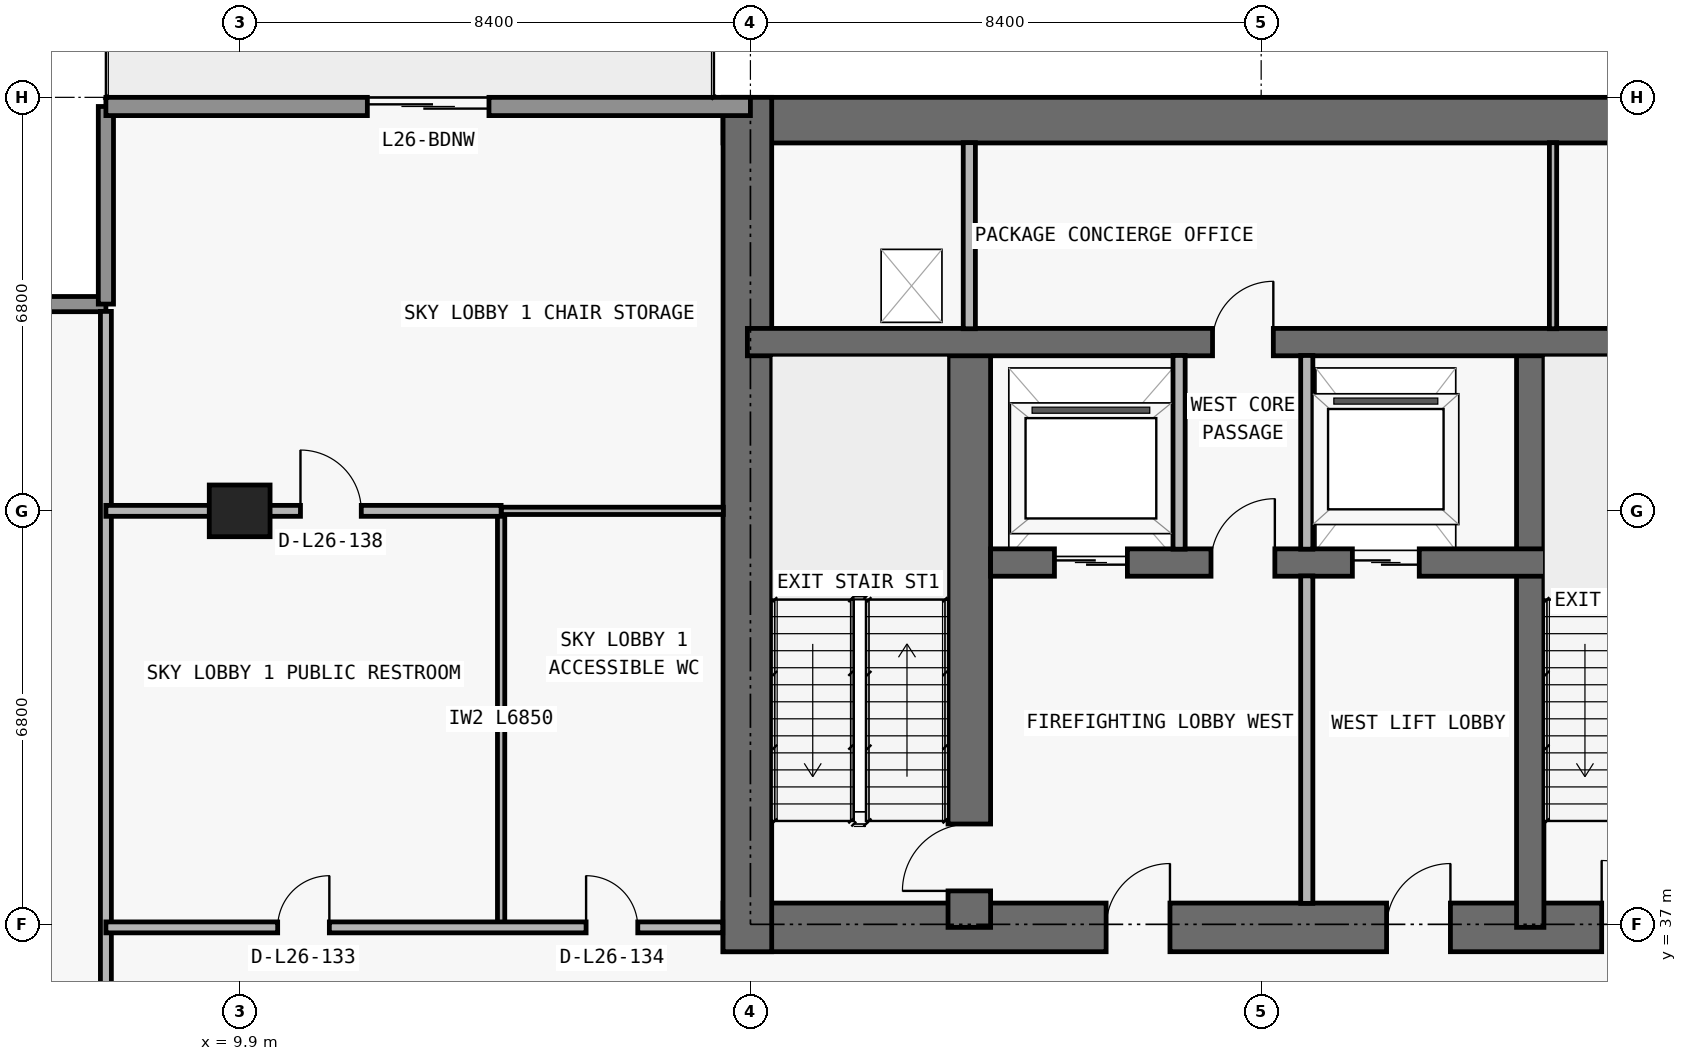
"""IFC4 building model, lengths in metres.
Left out: names, types, materials, properties, quantities, classifications, styles, units other than length and angle.
Written with IfcOpenShell. Run it as: python <this file> out.ifc"""

import sys

from ifc_helpers import new_model, si_unit, direction, frame, frame_2d, origin, origin_2d, place, context, subcontext, project, spatial, rectangle, extrude, element, fill, save


model = new_model("IFC4")
c1 = context("Model", 3, precision=1e-05, world=origin(), true_north=direction((0.0, 1.0)))
c2 = subcontext(c1, "Body", "Model", "MODEL_VIEW")
j1 = project(units=[si_unit("LENGTHUNIT", "METRE"), si_unit("PLANEANGLEUNIT", "RADIAN")], contexts=[c1])
p1 = place(None, origin())
s1 = spatial("IfcSite", under=j1, at=p1, CompositionType="ELEMENT")
p2 = place(p1, origin())
s2 = spatial("IfcBuilding", under=s1, at=p2, CompositionType="ELEMENT")
p3 = place(p2, frame((0.0, 0.0, 97.8)))
s3 = spatial("IfcBuildingStorey", under=s2, at=p3, CompositionType="ELEMENT", Elevation=97.8)
p4 = place(p3, frame((9.9, 43.8, 0.0), z_axis=(0.0, 0.0, 1.0), x_axis=(1.0, 0.0, 0.0)))
e1 = element("IfcColumn", 1, at=p4, inside=s3, PredefinedType="COLUMN", context=c2, shape_type="SweptSolid", body=[
    extrude(rectangle(XDim=1.0, YDim=0.85, at=origin_2d()), origin(), (0.0, 0.0, 1.0), 4.55),
])
p5 = place(p3, frame((17.85, 36.95, 0.0), z_axis=(0.0, 0.0, 1.0), x_axis=(1.0, 0.0, 0.0)))
e2 = element("IfcWall", 2, at=p5, inside=s3, PredefinedType="SHEAR", context=c2, shape_type="SweptSolid", body=[
    extrude(rectangle(XDim=42.1, YDim=0.8, at=frame_2d((21.05, 0.0))), origin(), (0.0, 0.0, 1.0), 4.55),
])
p6 = place(p5, frame((14.45, 0.0, 0.0)))
e3 = element("IfcOpeningElement", 3, at=p6, cuts=e2, PredefinedType="OPENING", context=c2, shape_type="SweptSolid", body=[
    extrude(rectangle(XDim=1.1, YDim=2.15, at=frame_2d((0.55, 1.075))), frame((0.0, 0.41, 0.0), z_axis=(0.0, -1.0, 0.0), x_axis=(1.0, 0.0, 0.0)), (0.0, 0.0, 1.0), 0.82),
])
p7 = place(p5, frame((6.3, 0.0, 0.0)))
e4 = element("IfcOpeningElement", 4, at=p7, cuts=e2, PredefinedType="OPENING", context=c2, shape_type="SweptSolid", body=[
    extrude(rectangle(XDim=1.05, YDim=2.15, at=frame_2d((0.525, 1.075))), frame((0.0, 0.41, 0.0), z_axis=(0.0, -1.0, 0.0), x_axis=(1.0, 0.0, 0.0)), (0.0, 0.0, 1.0), 0.82),
])
p8 = place(p5, frame((34.8, 0.0, 0.0)))
e5 = element("IfcOpeningElement", 5, at=p8, cuts=e2, PredefinedType="OPENING", context=c2, shape_type="SweptSolid", body=[
    extrude(rectangle(XDim=1.05, YDim=2.15, at=frame_2d((0.525, 1.075))), frame((0.0, 0.41, 0.0), z_axis=(0.0, -1.0, 0.0), x_axis=(1.0, 0.0, 0.0)), (0.0, 0.0, 1.0), 0.82),
])
p9 = place(p5, frame((10.913, 0.0, 0.0)))
e6 = element("IfcOpeningElement", 6, at=p9, cuts=e2, PredefinedType="OPENING", context=c2, shape_type="SweptSolid", body=[
    extrude(rectangle(XDim=1.05, YDim=2.15, at=frame_2d((0.525, 1.075))), frame((0.0, 0.41, 0.0), z_axis=(0.0, -1.0, 0.0), x_axis=(1.0, 0.0, 0.0)), (0.0, 0.0, 1.0), 0.82),
])
p10 = place(p5, frame((24.15, 0.0, 0.0)))
e7 = element("IfcOpeningElement", 7, at=p10, cuts=e2, PredefinedType="OPENING", context=c2, shape_type="SweptSolid", body=[
    extrude(rectangle(XDim=1.05, YDim=2.15, at=frame_2d((0.525, 1.075))), frame((0.0, 0.41, 0.0), z_axis=(0.0, -1.0, 0.0), x_axis=(1.0, 0.0, 0.0)), (0.0, 0.0, 1.0), 0.82),
])
p11 = place(p3, frame((17.85, 50.225, 0.0), z_axis=(0.0, 0.0, 1.0), x_axis=(1.0, 0.0, 0.0)))
e8 = element("IfcWall", 8, at=p11, inside=s3, PredefinedType="SHEAR", context=c2, shape_type="SweptSolid", body=[
    extrude(rectangle(XDim=42.1, YDim=0.75, at=frame_2d((21.05, 0.0))), origin(), (0.0, 0.0, 1.0), 4.55),
])
p12 = place(p3, frame((18.25, 36.55, 0.0), z_axis=(0.0, 0.0, 1.0), x_axis=(0.0, 1.0, 0.0)))
e9 = element("IfcWall", 9, at=p12, inside=s3, PredefinedType="SHEAR", context=c2, shape_type="SweptSolid", body=[
    extrude(rectangle(XDim=14.05, YDim=0.8, at=frame_2d((7.025, 0.0))), origin(), (0.0, 0.0, 1.0), 4.55),
])
p13 = place(p3, frame((21.9, 36.95, 0.0), z_axis=(0.0, 0.0, 1.0), x_axis=(0.0, 1.0, 0.0)))
e10 = element("IfcWall", 10, at=p13, inside=s3, PredefinedType="SHEAR", context=c2, shape_type="SweptSolid", body=[
    extrude(rectangle(XDim=9.625, YDim=0.7, at=frame_2d((4.812, 0.0))), origin(), (0.0, 0.0, 1.0), 4.55),
])
p14 = place(p13, frame((0.6, 0.0, 0.0)))
e11 = element("IfcOpeningElement", 11, at=p14, cuts=e10, PredefinedType="OPENING", context=c2, shape_type="SweptSolid", body=[
    extrude(rectangle(XDim=1.1, YDim=2.15, at=frame_2d((0.55, 1.075))), frame((0.0, 0.36, 0.0), z_axis=(0.0, -1.0, 0.0), x_axis=(1.0, 0.0, 0.0)), (0.0, 0.0, 1.0), 0.72),
])
p15 = place(p3, frame((31.125, 36.95, 0.0), z_axis=(0.0, 0.0, 1.0), x_axis=(0.0, 1.0, 0.0)))
e12 = element("IfcWall", 12, at=p15, inside=s3, PredefinedType="SHEAR", context=c2, shape_type="SweptSolid", body=[
    extrude(rectangle(XDim=9.625, YDim=0.45, at=frame_2d((4.812, 0.0))), origin(), (0.0, 0.0, 1.0), 4.55),
])
p16 = place(p3, frame((22.25, 42.95, 0.0), z_axis=(0.0, 0.0, 1.0), x_axis=(1.0, 0.0, 0.0)))
e13 = element("IfcWall", 13, at=p16, inside=s3, PredefinedType="SHEAR", context=c2, shape_type="SweptSolid", body=[
    extrude(rectangle(XDim=33.3, YDim=0.45, at=frame_2d((16.65, 0.0))), origin(), (0.0, 0.0, 1.0), 4.55),
])
p17 = place(p16, frame((1.05, 0.0, 0.0)))
e14 = element("IfcOpeningElement", 14, at=p17, cuts=e13, PredefinedType="OPENING", context=c2, shape_type="SweptSolid", body=[
    extrude(rectangle(XDim=1.2, YDim=2.2, at=frame_2d((0.6, 1.1))), frame((0.0, 0.235, 0.0), z_axis=(0.0, -1.0, 0.0), x_axis=(1.0, 0.0, 0.0)), (0.0, 0.0, 1.0), 0.47),
])
p18 = place(p16, frame((31.05, 0.0, 0.0)))
e15 = element("IfcOpeningElement", 15, at=p18, cuts=e13, PredefinedType="OPENING", context=c2, shape_type="SweptSolid", body=[
    extrude(rectangle(XDim=1.2, YDim=2.2, at=frame_2d((0.6, 1.1))), frame((0.0, 0.235, 0.0), z_axis=(0.0, -1.0, 0.0), x_axis=(1.0, 0.0, 0.0)), (0.0, 0.0, 1.0), 0.47),
])
p19 = place(p16, frame((13.5, 0.0, 0.0)))
e16 = element("IfcOpeningElement", 16, at=p19, cuts=e13, PredefinedType="OPENING", context=c2, shape_type="SweptSolid", body=[
    extrude(rectangle(XDim=1.1, YDim=2.2, at=frame_2d((0.55, 1.1))), frame((0.0, 0.235, 0.0), z_axis=(0.0, -1.0, 0.0), x_axis=(1.0, 0.0, 0.0)), (0.0, 0.0, 1.0), 0.47),
])
p20 = place(p16, frame((16.1, 0.0, 0.0)))
e17 = element("IfcOpeningElement", 17, at=p20, cuts=e13, PredefinedType="OPENING", context=c2, shape_type="SweptSolid", body=[
    extrude(rectangle(XDim=1.1, YDim=2.2, at=frame_2d((0.55, 1.1))), frame((0.0, 0.235, 0.0), z_axis=(0.0, -1.0, 0.0), x_axis=(1.0, 0.0, 0.0)), (0.0, 0.0, 1.0), 0.47),
])
p21 = place(p16, frame((18.7, 0.0, 0.0)))
e18 = element("IfcOpeningElement", 18, at=p21, cuts=e13, PredefinedType="OPENING", context=c2, shape_type="SweptSolid", body=[
    extrude(rectangle(XDim=1.1, YDim=2.2, at=frame_2d((0.55, 1.1))), frame((0.0, 0.235, 0.0), z_axis=(0.0, -1.0, 0.0), x_axis=(1.0, 0.0, 0.0)), (0.0, 0.0, 1.0), 0.47),
])
p22 = place(p16, frame((21.4, 0.0, 0.0)))
e19 = element("IfcOpeningElement", 19, at=p22, cuts=e13, PredefinedType="OPENING", context=c2, shape_type="SweptSolid", body=[
    extrude(rectangle(XDim=1.1, YDim=2.2, at=frame_2d((0.55, 1.1))), frame((0.0, 0.235, 0.0), z_axis=(0.0, -1.0, 0.0), x_axis=(1.0, 0.0, 0.0)), (0.0, 0.0, 1.0), 0.47),
])
p23 = place(p16, frame((24.0, 0.0, 0.0)))
e20 = element("IfcOpeningElement", 20, at=p23, cuts=e13, PredefinedType="OPENING", context=c2, shape_type="SweptSolid", body=[
    extrude(rectangle(XDim=1.1, YDim=2.2, at=frame_2d((0.55, 1.1))), frame((0.0, 0.235, 0.0), z_axis=(0.0, -1.0, 0.0), x_axis=(1.0, 0.0, 0.0)), (0.0, 0.0, 1.0), 0.47),
])
p24 = place(p16, frame((26.45, 0.0, 0.0)))
e21 = element("IfcOpeningElement", 21, at=p24, cuts=e13, PredefinedType="OPENING", context=c2, shape_type="SweptSolid", body=[
    extrude(rectangle(XDim=1.1, YDim=2.2, at=frame_2d((0.55, 1.1))), frame((0.0, 0.235, 0.0), z_axis=(0.0, -1.0, 0.0), x_axis=(1.0, 0.0, 0.0)), (0.0, 0.0, 1.0), 0.47),
])
p25 = place(p16, frame((5.95, 0.0, 0.0)))
e22 = element("IfcOpeningElement", 22, at=p25, cuts=e13, PredefinedType="OPENING", context=c2, shape_type="SweptSolid", body=[
    extrude(rectangle(XDim=1.1, YDim=2.2, at=frame_2d((0.55, 1.1))), frame((0.0, 0.235, 0.0), z_axis=(0.0, -1.0, 0.0), x_axis=(1.0, 0.0, 0.0)), (0.0, 0.0, 1.0), 0.47),
])
p26 = place(p16, frame((3.625, 0.0, 0.0)))
e23 = element("IfcOpeningElement", 23, at=p26, cuts=e13, PredefinedType="OPENING", context=c2, shape_type="SweptSolid", body=[
    extrude(rectangle(XDim=1.05, YDim=2.15, at=frame_2d((0.525, 1.075))), frame((0.0, 0.235, 0.0), z_axis=(0.0, -1.0, 0.0), x_axis=(1.0, 0.0, 0.0)), (0.0, 0.0, 1.0), 0.47),
])
p27 = place(p16, frame((28.675, 0.0, 0.0)))
e24 = element("IfcOpeningElement", 24, at=p27, cuts=e13, PredefinedType="OPENING", context=c2, shape_type="SweptSolid", body=[
    extrude(rectangle(XDim=1.05, YDim=2.15, at=frame_2d((0.525, 1.075))), frame((0.0, 0.235, 0.0), z_axis=(0.0, -1.0, 0.0), x_axis=(1.0, 0.0, 0.0)), (0.0, 0.0, 1.0), 0.47),
])
p28 = place(p3, frame((18.25, 46.575, 0.0), z_axis=(0.0, 0.0, 1.0), x_axis=(1.0, 0.0, 0.0)))
e25 = element("IfcWall", 25, at=p28, inside=s3, PredefinedType="SHEAR", context=c2, shape_type="SweptSolid", body=[
    extrude(rectangle(XDim=41.3, YDim=0.45, at=frame_2d((20.65, 0.0))), origin(), (0.0, 0.0, 1.0), 4.55),
])
p29 = place(p28, frame((7.65, 0.0, 0.0)))
e26 = element("IfcOpeningElement", 26, at=p29, cuts=e25, PredefinedType="OPENING", context=c2, shape_type="SweptSolid", body=[
    extrude(rectangle(XDim=1.0, YDim=2.2, at=frame_2d((0.5, 1.1))), frame((0.0, 0.235, 0.0), z_axis=(0.0, -1.0, 0.0), x_axis=(1.0, 0.0, 0.0)), (0.0, 0.0, 1.0), 0.47),
])
p30 = place(p28, frame((32.675, 0.0, 0.0)))
e27 = element("IfcOpeningElement", 27, at=p30, cuts=e25, PredefinedType="OPENING", context=c2, shape_type="SweptSolid", body=[
    extrude(rectangle(XDim=1.05, YDim=2.15, at=frame_2d((0.525, 1.075))), frame((0.0, 0.235, 0.0), z_axis=(0.0, -1.0, 0.0), x_axis=(1.0, 0.0, 0.0)), (0.0, 0.0, 1.0), 0.47),
])
p31 = place(p3, frame((4.05, 47.2, 0.0), z_axis=(0.0, 0.0, 1.0), x_axis=(1.0, 0.0, 0.0)))
e28 = element("IfcWall", 28, at=p31, inside=s3, PredefinedType="ELEMENTEDWALL", context=c2, shape_type="SweptSolid", body=[
    extrude(rectangle(XDim=3.65, YDim=0.25, at=frame_2d((1.825, 0.0))), origin(), (0.0, 0.0, 1.0), 4.55),
])
p32 = place(p3, frame((7.7, 47.2, 0.0), z_axis=(0.0, 0.0, 1.0), x_axis=(0.0, 1.0, 0.0)))
e29 = element("IfcWall", 29, at=p32, inside=s3, PredefinedType="ELEMENTEDWALL", context=c2, shape_type="SweptSolid", body=[
    extrude(rectangle(XDim=3.25, YDim=0.25, at=frame_2d((1.625, 0.0))), origin(), (0.0, 0.0, 1.0), 4.55),
])
p33 = place(p3, frame((7.7, 50.45, 0.0), z_axis=(0.0, 0.0, 1.0), x_axis=(1.0, 0.0, 0.0)))
e30 = element("IfcWall", 30, at=p33, inside=s3, PredefinedType="STANDARD", context=c2, shape_type="SweptSolid", body=[
    extrude(rectangle(XDim=10.6, YDim=0.3, at=frame_2d((5.3, 0.0))), origin(), (0.0, 0.0, 1.0), 4.55),
])
p34 = place(p33, frame((4.3, 0.0, 0.0)))
e31 = element("IfcOpeningElement", 31, at=p34, cuts=e30, PredefinedType="OPENING", context=c2, shape_type="SweptSolid", body=[
    extrude(rectangle(XDim=2.0, YDim=2.3, at=frame_2d((1.0, 1.15))), frame((0.0, 0.16, 0.0), z_axis=(0.0, -1.0, 0.0), x_axis=(1.0, 0.0, 0.0)), (0.0, 0.0, 1.0), 0.32),
])
p35 = place(p3, frame((7.7, 8.885, 0.0), z_axis=(0.0, 0.0, 1.0), x_axis=(0.0, 1.0, 0.0)))
e32 = element("IfcWall", 32, at=p35, inside=s3, PredefinedType="PARTITIONING", context=c2, shape_type="SweptSolid", body=[
    extrude(rectangle(XDim=38.195, YDim=0.18, at=frame_2d((19.098, 0.0))), origin(), (0.0, 0.0, 1.0), 4.55),
])
p36 = place(p3, frame((14.2, 36.95, 0.0), z_axis=(0.0, 0.0, 1.0), x_axis=(0.0, 1.0, 0.0)))
e33 = element("IfcWall", 33, at=p36, inside=s3, PredefinedType="PARTITIONING", context=c2, shape_type="SweptSolid", body=[
    extrude(rectangle(XDim=6.85, YDim=0.12, at=frame_2d((3.425, 0.0))), origin(), (0.0, 0.0, 1.0), 3.923),
])
p37 = place(p3, frame((21.9, 46.795, 0.0), z_axis=(0.0, 0.0, 1.0), x_axis=(0.0, 1.0, 0.0)))
e34 = element("IfcWall", 34, at=p37, inside=s3, PredefinedType="PARTITIONING", context=c2, shape_type="SweptSolid", body=[
    extrude(rectangle(XDim=3.06, YDim=0.2, at=frame_2d((1.53, 0.0))), origin(), (0.0, 0.0, 1.0), 4.55),
])
p38 = place(p3, frame((25.35, 43.17, 0.0), z_axis=(0.0, 0.0, 1.0), x_axis=(0.0, 1.0, 0.0)))
e35 = element("IfcWall", 35, at=p38, inside=s3, PredefinedType="PARTITIONING", context=c2, shape_type="SweptSolid", body=[
    extrude(rectangle(XDim=3.185, YDim=0.2, at=frame_2d((1.593, 0.0))), origin(), (0.0, 0.0, 1.0), 4.55),
])
p39 = place(p3, frame((27.45, 37.345, 0.0), z_axis=(0.0, 0.0, 1.0), x_axis=(0.0, 1.0, 0.0)))
e36 = element("IfcWall", 36, at=p39, inside=s3, PredefinedType="PARTITIONING", context=c2, shape_type="SweptSolid", body=[
    extrude(rectangle(XDim=5.385, YDim=0.2, at=frame_2d((2.692, 0.0))), origin(), (0.0, 0.0, 1.0), 4.55),
])
p40 = place(p3, frame((27.45, 43.17, 0.0), z_axis=(0.0, 0.0, 1.0), x_axis=(0.0, 1.0, 0.0)))
e37 = element("IfcWall", 37, at=p40, inside=s3, PredefinedType="PARTITIONING", context=c2, shape_type="SweptSolid", body=[
    extrude(rectangle(XDim=3.185, YDim=0.2, at=frame_2d((1.593, 0.0))), origin(), (0.0, 0.0, 1.0), 4.55),
])
p41 = place(p3, frame((31.5, 46.795, 0.0), z_axis=(0.0, 0.0, 1.0), x_axis=(0.0, 1.0, 0.0)))
e38 = element("IfcWall", 38, at=p41, inside=s3, PredefinedType="PARTITIONING", context=c2, shape_type="SweptSolid", body=[
    extrude(rectangle(XDim=3.06, YDim=0.12, at=frame_2d((1.53, 0.0))), origin(), (0.0, 0.0, 1.0), 4.55),
])
p42 = place(p3, frame((7.7, 36.95, 0.0), z_axis=(0.0, 0.0, 1.0), x_axis=(1.0, 0.0, 0.0)))
e39 = element("IfcWall", 39, at=p42, inside=s3, PredefinedType="PARTITIONING", context=c2, shape_type="SweptSolid", body=[
    extrude(rectangle(XDim=10.145, YDim=0.18, at=frame_2d((5.073, 0.0))), origin(), (0.0, 0.0, 1.0), 4.55),
])
p43 = place(p42, frame((2.825, 0.0, 0.0)))
e40 = element("IfcOpeningElement", 40, at=p43, cuts=e39, PredefinedType="OPENING", context=c2, shape_type="SweptSolid", body=[
    extrude(rectangle(XDim=0.85, YDim=2.1, at=frame_2d((0.425, 1.05))), frame((0.0, 0.1, 0.0), z_axis=(0.0, -1.0, 0.0), x_axis=(1.0, 0.0, 0.0)), (0.0, 0.0, 1.0), 0.2),
])
p44 = place(p42, frame((7.897, 0.0, 0.0)))
e41 = element("IfcOpeningElement", 41, at=p44, cuts=e39, PredefinedType="OPENING", context=c2, shape_type="SweptSolid", body=[
    extrude(rectangle(XDim=0.85, YDim=2.1, at=frame_2d((0.425, 1.05))), frame((0.0, 0.1, 0.0), z_axis=(0.0, -1.0, 0.0), x_axis=(1.0, 0.0, 0.0)), (0.0, 0.0, 1.0), 0.2),
])
p45 = place(p3, frame((7.7, 43.8, 0.0), z_axis=(0.0, 0.0, 1.0), x_axis=(1.0, 0.0, 0.0)))
e42 = element("IfcWall", 42, at=p45, inside=s3, PredefinedType="PARTITIONING", context=c2, shape_type="SweptSolid", body=[
    extrude(rectangle(XDim=6.5, YDim=0.18, at=frame_2d((3.25, 0.0))), origin(), (0.0, 0.0, 1.0), 3.839),
])
p46 = place(p45, frame((3.2, 0.0, 0.0)))
e43 = element("IfcOpeningElement", 43, at=p46, cuts=e42, PredefinedType="OPENING", context=c2, shape_type="SweptSolid", body=[
    extrude(rectangle(XDim=1.0, YDim=2.2, at=frame_2d((0.5, 1.1))), frame((0.0, 0.1, 0.0), z_axis=(0.0, -1.0, 0.0), x_axis=(1.0, 0.0, 0.0)), (0.0, 0.0, 1.0), 0.2),
])
p47 = place(p3, frame((14.205, 43.8, 0.0), z_axis=(0.0, 0.0, 1.0), x_axis=(1.0, 0.0, 0.0)))
e44 = element("IfcWall", 44, at=p47, inside=s3, PredefinedType="PARTITIONING", context=c2, shape_type="SweptSolid", body=[
    extrude(rectangle(XDim=3.65, YDim=0.12, at=frame_2d((1.825, 0.0))), origin(), (0.0, 0.0, 1.0), 3.839),
])
p48 = place(p34, origin())
e45 = element("IfcDoor", 45, at=p48, inside=s3, OperationType="DOUBLE_DOOR_SLIDING", PredefinedType="DOOR", context=c2, shape_type="SweptSolid", body=[
    extrude(rectangle(XDim=2.0, YDim=2.3, at=frame_2d((1.0, 1.15))), frame((0.0, 0.025, 0.0), z_axis=(0.0, -1.0, 0.0), x_axis=(1.0, 0.0, 0.0)), (0.0, 0.0, 1.0), 0.05),
])
fill(e31, e45)
p49 = place(p17, origin())
e46 = element("IfcDoor", 46, at=p49, inside=s3, OperationType="DOUBLE_DOOR_SLIDING", PredefinedType="DOOR", context=c2, shape_type="SweptSolid", body=[
    extrude(rectangle(XDim=1.2, YDim=2.2, at=frame_2d((0.6, 1.1))), frame((0.0, 0.025, 0.0), z_axis=(0.0, -1.0, 0.0), x_axis=(1.0, 0.0, 0.0)), (0.0, 0.0, 1.0), 0.05),
])
fill(e14, e46)
p50 = place(p25, origin())
e47 = element("IfcDoor", 47, at=p50, inside=s3, OperationType="DOUBLE_DOOR_SLIDING", PredefinedType="DOOR", context=c2, shape_type="SweptSolid", body=[
    extrude(rectangle(XDim=1.1, YDim=2.2, at=frame_2d((0.55, 1.1))), frame((0.0, 0.025, 0.0), z_axis=(0.0, -1.0, 0.0), x_axis=(1.0, 0.0, 0.0)), (0.0, 0.0, 1.0), 0.05),
])
fill(e22, e47)
p51 = place(p6, origin())
e48 = element("IfcDoor", 48, at=p51, inside=s3, OperationType="SINGLE_SWING_LEFT", PredefinedType="DOOR", context=c2, shape_type="SweptSolid", body=[
    extrude(rectangle(XDim=1.1, YDim=2.15, at=frame_2d((0.55, 1.075))), frame((0.0, 0.025, 0.0), z_axis=(0.0, -1.0, 0.0), x_axis=(1.0, 0.0, 0.0)), (0.0, 0.0, 1.0), 0.05),
])
fill(e3, e48)
p52 = place(p7, origin())
e49 = element("IfcDoor", 49, at=p52, inside=s3, OperationType="SINGLE_SWING_RIGHT", PredefinedType="DOOR", context=c2, shape_type="SweptSolid", body=[
    extrude(rectangle(XDim=1.05, YDim=2.15, at=frame_2d((0.525, 1.075))), frame((0.0, 0.025, 0.0), z_axis=(0.0, -1.0, 0.0), x_axis=(1.0, 0.0, 0.0)), (0.0, 0.0, 1.0), 0.05),
])
fill(e4, e49)
p53 = place(p14, origin())
e50 = element("IfcDoor", 50, at=p53, inside=s3, OperationType="SINGLE_SWING_LEFT", PredefinedType="DOOR", context=c2, shape_type="SweptSolid", body=[
    extrude(rectangle(XDim=1.1, YDim=2.15, at=frame_2d((0.55, 1.075))), frame((0.0, 0.025, 0.0), z_axis=(0.0, -1.0, 0.0), x_axis=(1.0, 0.0, 0.0)), (0.0, 0.0, 1.0), 0.05),
])
fill(e11, e50)
p54 = place(p26, origin())
e51 = element("IfcDoor", 51, at=p54, inside=s3, OperationType="SINGLE_SWING_RIGHT", PredefinedType="DOOR", context=c2, shape_type="SweptSolid", body=[
    extrude(rectangle(XDim=1.05, YDim=2.15, at=frame_2d((0.525, 1.075))), frame((0.0, 0.025, 0.0), z_axis=(0.0, -1.0, 0.0), x_axis=(1.0, 0.0, 0.0)), (0.0, 0.0, 1.0), 0.05),
])
fill(e23, e51)
p55 = place(p9, origin())
e52 = element("IfcDoor", 52, at=p55, inside=s3, OperationType="SINGLE_SWING_RIGHT", PredefinedType="DOOR", context=c2, shape_type="SweptSolid", body=[
    extrude(rectangle(XDim=1.05, YDim=2.15, at=frame_2d((0.525, 1.075))), frame((0.0, 0.025, 0.0), z_axis=(0.0, -1.0, 0.0), x_axis=(1.0, 0.0, 0.0)), (0.0, 0.0, 1.0), 0.05),
])
fill(e6, e52)
p56 = place(p29, origin())
e53 = element("IfcDoor", 53, at=p56, inside=s3, OperationType="SINGLE_SWING_RIGHT", PredefinedType="DOOR", context=c2, shape_type="SweptSolid", body=[
    extrude(rectangle(XDim=1.0, YDim=2.2, at=frame_2d((0.5, 1.1))), frame((0.0, 0.025, 0.0), z_axis=(0.0, -1.0, 0.0), x_axis=(1.0, 0.0, 0.0)), (0.0, 0.0, 1.0), 0.05),
])
fill(e26, e53)
p57 = place(p43, origin())
e54 = element("IfcDoor", 54, at=p57, inside=s3, OperationType="SINGLE_SWING_RIGHT", PredefinedType="DOOR", context=c2, shape_type="SweptSolid", body=[
    extrude(rectangle(XDim=0.85, YDim=2.1, at=frame_2d((0.425, 1.05))), frame((0.0, 0.025, 0.0), z_axis=(0.0, -1.0, 0.0), x_axis=(1.0, 0.0, 0.0)), (0.0, 0.0, 1.0), 0.05),
])
fill(e40, e54)
p58 = place(p44, origin())
e55 = element("IfcDoor", 55, at=p58, inside=s3, OperationType="SINGLE_SWING_LEFT", PredefinedType="DOOR", context=c2, shape_type="SweptSolid", body=[
    extrude(rectangle(XDim=0.85, YDim=2.1, at=frame_2d((0.425, 1.05))), frame((0.0, 0.025, 0.0), z_axis=(0.0, -1.0, 0.0), x_axis=(1.0, 0.0, 0.0)), (0.0, 0.0, 1.0), 0.05),
])
fill(e41, e55)
p59 = place(p46, origin())
e56 = element("IfcDoor", 56, at=p59, inside=s3, OperationType="SINGLE_SWING_LEFT", PredefinedType="DOOR", context=c2, shape_type="SweptSolid", body=[
    extrude(rectangle(XDim=1.0, YDim=2.2, at=frame_2d((0.5, 1.1))), frame((0.0, 0.025, 0.0), z_axis=(0.0, -1.0, 0.0), x_axis=(1.0, 0.0, 0.0)), (0.0, 0.0, 1.0), 0.05),
])
fill(e43, e56)
save(model, sys.argv[1])
